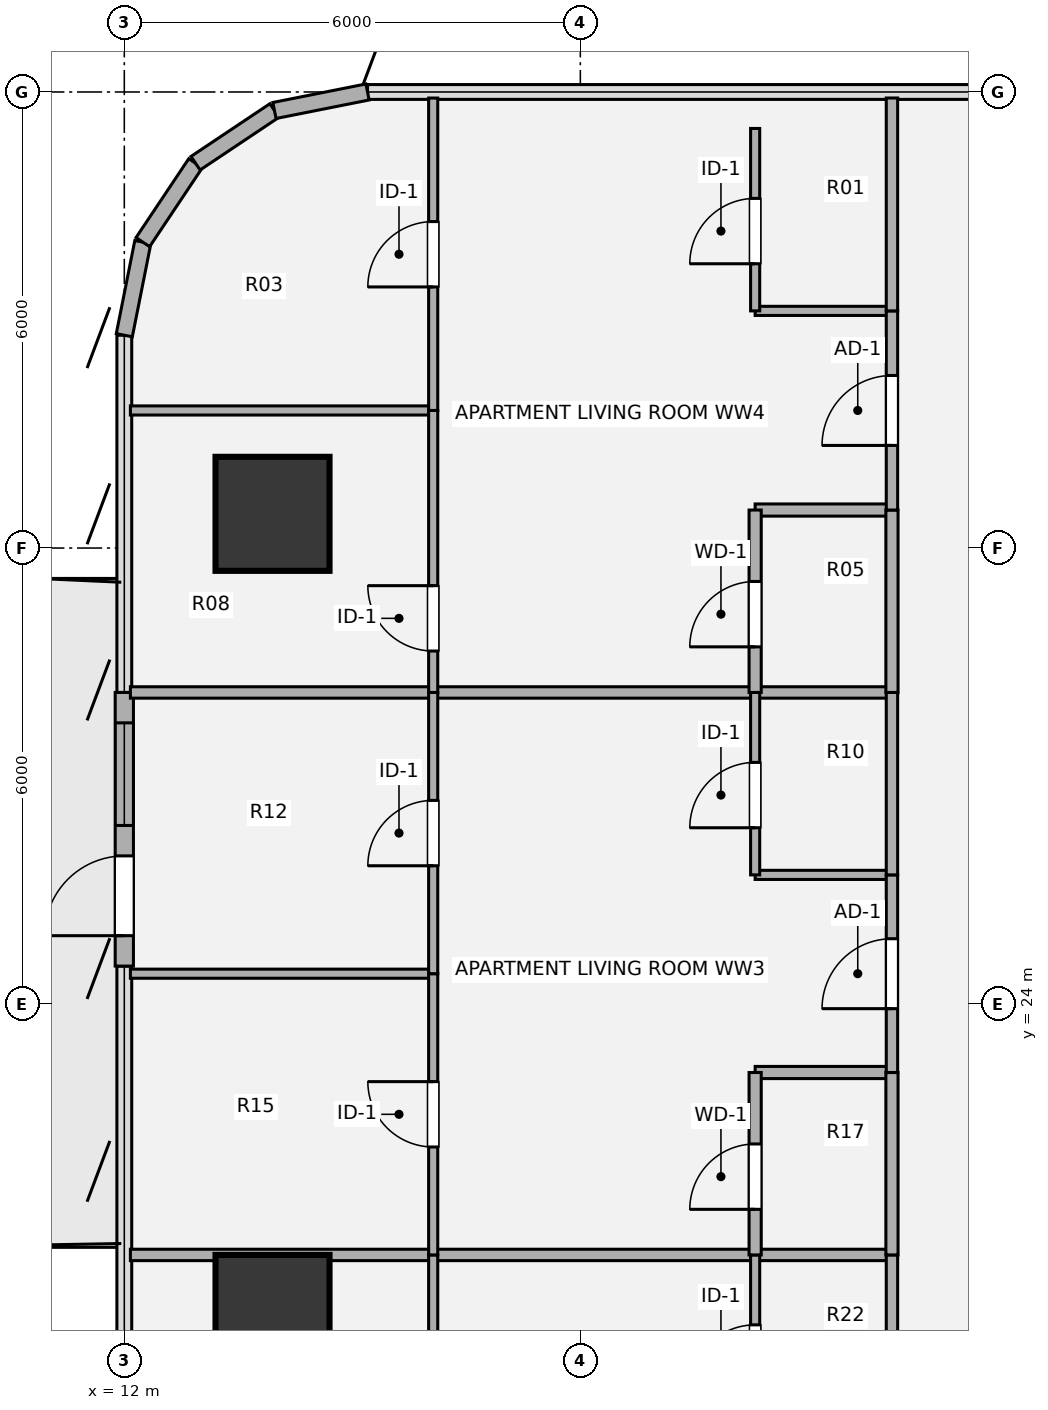
"""IFC4 building model, lengths in metres.
Left out: names, types, materials, properties, quantities, classifications, styles, units other than length and angle.
Written with IfcOpenShell. Run it as: python <this file> out.ifc"""

import sys

from ifc_helpers import new_model, si_unit, direction, frame, frame_2d, origin, origin_2d, place, context, subcontext, project, spatial, rectangle, hollow_circle, extrude, source, transform, mapped, element, fill, save


model = new_model("IFC4")
c1 = context("Model", 3, precision=1e-05, world=origin(), true_north=direction((0.0, 1.0)))
c2 = subcontext(c1, "Body", "Model", "MODEL_VIEW")
j1 = project(units=[si_unit("LENGTHUNIT", "METRE"), si_unit("PLANEANGLEUNIT", "RADIAN")], contexts=[c1])
p1 = place(None, origin())
s1 = spatial("IfcSite", under=j1, at=p1, CompositionType="ELEMENT")
p2 = place(p1, origin())
s2 = spatial("IfcBuilding", under=s1, at=p2, CompositionType="ELEMENT")
p3 = place(p2, frame((0.0, 0.0, 34.56)))
s3 = spatial("IfcBuildingStorey", under=s2, at=p3, CompositionType="ELEMENT", Elevation=34.56)
m1 = source(origin(), c2, "Body", "SweptSolid", [
    extrude(hollow_circle(Radius=0.75, WallThickness=0.05, at=origin_2d()), origin(), (0.0, 0.0, 1.0), 3.78),
])
for number, where, z_axis, x_axis in (
    (1, (13.95, 19.95, 0.0), (0.0, 0.0, 1.0), (1.0, 0.0, 0.0)),
    (2, (13.95, 30.45, 0.0), (0.0, 0.0, 1.0), (1.0, 0.0, 0.0)),
):
    element("IfcColumn", number, at=place(p3, frame(where, z_axis=z_axis, x_axis=x_axis)), inside=s3, PredefinedType="COLUMN", context=c2, shape_type="MappedRepresentation", body=[
        mapped(m1, transform((0.0, 0.0, 0.0), x_axis=(1.0, 0.0, 0.0), y_axis=(0.0, 1.0, 0.0), z_axis=(0.0, 0.0, 1.0), scale=1.0)),
    ])
p4 = place(p3, frame((12.0, 24.5, 0.0), z_axis=(0.0, 0.0, 1.0), x_axis=(0.0, 1.0, 0.0)))
e3 = element("IfcWall", 3, at=p4, inside=s3, PredefinedType="SOLIDWALL", context=c2, shape_type="SweptSolid", body=[
    extrude(rectangle(XDim=3.6, YDim=0.24, at=frame_2d((1.8, 0.0))), origin(), (0.0, 0.0, 1.0), 3.53),
])
p5 = place(p4, frame((0.4, 0.0, 0.0)))
e4 = element("IfcOpeningElement", 4, at=p5, cuts=e3, PredefinedType="OPENING", context=c2, shape_type="SweptSolid", body=[
    extrude(rectangle(XDim=1.05, YDim=2.15, at=origin_2d()), frame((0.525, 0.13, 1.075), z_axis=(0.0, -1.0, 0.0), x_axis=(1.0, 0.0, 0.0)), (0.0, 0.0, 1.0), 0.26),
])
p6 = place(p4, frame((1.85, 0.0, 0.85)))
e5 = element("IfcOpeningElement", 5, at=p6, cuts=e3, PredefinedType="OPENING", context=c2, shape_type="SweptSolid", body=[
    extrude(rectangle(XDim=1.35, YDim=1.35, at=origin_2d()), frame((0.675, 0.13, 0.675), z_axis=(0.0, -1.0, 0.0), x_axis=(1.0, 0.0, 0.0)), (0.0, 0.0, 1.0), 0.26),
])
for number, where, z_axis, x_axis in (
    (6, (12.0, 32.8, 0.0), (0.0, 0.0, 1.0), (0.195, 0.981, 0.0)),
    (7, (12.244, 34.025, 0.0), (0.0, 0.0, 1.0), (0.556, 0.831, 0.0)),
    (8, (12.937, 35.063, 0.0), (0.0, 0.0, 1.0), (0.831, 0.556, 0.0)),
    (9, (13.975, 35.756, 0.0), (0.0, 0.0, 1.0), (0.981, 0.195, 0.0)),
):
    element("IfcWall", number, at=place(p3, frame(where, z_axis=z_axis, x_axis=x_axis)), inside=s3, PredefinedType="SOLIDWALL", context=c2, shape_type="SweptSolid", body=[
        extrude(rectangle(XDim=1.249, YDim=0.215, at=frame_2d((0.624, 0.0))), origin(), (0.0, 0.0, 1.0), 3.53),
    ])
p7 = place(p3, frame((12.08, 20.7, 0.0), z_axis=(0.0, 0.0, 1.0), x_axis=(1.0, 0.0, 0.0)))
e10 = element("IfcWall", 10, at=p7, inside=s3, PredefinedType="PARTITIONING", context=c2, shape_type="SweptSolid", body=[
    extrude(rectangle(XDim=10.02, YDim=0.15, at=frame_2d((5.01, 0.0))), origin(), (0.0, 0.0, 1.0), 2.982),
])
p8 = place(p3, frame((20.3, 23.1, 0.0), z_axis=(0.0, 0.0, 1.0), x_axis=(1.0, 0.0, 0.0)))
e11 = element("IfcWall", 11, at=p8, inside=s3, PredefinedType="PLUMBINGWALL", context=c2, shape_type="SweptSolid", body=[
    extrude(rectangle(XDim=1.8, YDim=0.16, at=frame_2d((0.9, 0.0))), origin(), (0.0, 0.0, 1.0), 3.055),
])
p9 = place(p3, frame((12.08, 24.4, 0.0), z_axis=(0.0, 0.0, 1.0), x_axis=(1.0, 0.0, 0.0)))
e12 = element("IfcWall", 12, at=p9, inside=s3, PredefinedType="PARTITIONING", context=c2, shape_type="SweptSolid", body=[
    extrude(rectangle(XDim=3.984, YDim=0.12, at=frame_2d((1.992, 0.0))), origin(), (0.0, 0.0, 1.0), 2.982),
])
p10 = place(p3, frame((20.3, 25.7, 0.0), z_axis=(0.0, 0.0, 1.0), x_axis=(1.0, 0.0, 0.0)))
e13 = element("IfcWall", 13, at=p10, inside=s3, PredefinedType="PARTITIONING", context=c2, shape_type="SweptSolid", body=[
    extrude(rectangle(XDim=1.8, YDim=0.12, at=frame_2d((0.9, 0.0))), origin(), (0.0, 0.0, 1.0), 2.982),
])
p11 = place(p3, frame((12.08, 28.1, 0.0), z_axis=(0.0, 0.0, 1.0), x_axis=(1.0, 0.0, 0.0)))
e14 = element("IfcWall", 14, at=p11, inside=s3, PredefinedType="PARTITIONING", context=c2, shape_type="SweptSolid", body=[
    extrude(rectangle(XDim=10.02, YDim=0.15, at=frame_2d((5.01, 0.0))), origin(), (0.0, 0.0, 1.0), 2.982),
])
p12 = place(p3, frame((20.3, 30.5, 0.0), z_axis=(0.0, 0.0, 1.0), x_axis=(1.0, 0.0, 0.0)))
e15 = element("IfcWall", 15, at=p12, inside=s3, PredefinedType="PLUMBINGWALL", context=c2, shape_type="SweptSolid", body=[
    extrude(rectangle(XDim=1.8, YDim=0.16, at=frame_2d((0.9, 0.0))), origin(), (0.0, 0.0, 1.0), 2.903),
])
p13 = place(p3, frame((12.08, 31.81, 0.0), z_axis=(0.0, 0.0, 1.0), x_axis=(1.0, 0.0, 0.0)))
e16 = element("IfcWall", 16, at=p13, inside=s3, PredefinedType="PARTITIONING", context=c2, shape_type="SweptSolid", body=[
    extrude(rectangle(XDim=3.984, YDim=0.12, at=frame_2d((1.992, 0.0))), origin(), (0.0, 0.0, 1.0), 3.5),
])
p14 = place(p3, frame((20.3, 33.12, 0.0), z_axis=(0.0, 0.0, 1.0), x_axis=(1.0, 0.0, 0.0)))
e17 = element("IfcWall", 17, at=p14, inside=s3, PredefinedType="PARTITIONING", context=c2, shape_type="SweptSolid", body=[
    extrude(rectangle(XDim=1.8, YDim=0.12, at=frame_2d((0.9, 0.0))), origin(), (0.0, 0.0, 1.0), 3.055),
])
p15 = place(p3, frame((16.064, 17.05, 0.0), z_axis=(0.0, 0.0, 1.0), x_axis=(0.0, 1.0, 0.0)))
e18 = element("IfcWall", 18, at=p15, inside=s3, PredefinedType="PARTITIONING", context=c2, shape_type="SweptSolid", body=[
    extrude(rectangle(XDim=3.65, YDim=0.12, at=frame_2d((1.825, 0.0))), origin(), (0.0, 0.0, 1.0), 3.5),
])
p16 = place(p15, frame((1.075, 0.0, 0.0)))
e19 = element("IfcOpeningElement", 19, at=p16, cuts=e18, PredefinedType="OPENING", context=c2, shape_type="SweptSolid", body=[
    extrude(rectangle(XDim=0.86, YDim=2.1, at=origin_2d()), frame((0.43, 0.07, 1.05), z_axis=(0.0, -1.0, 0.0), x_axis=(1.0, 0.0, 0.0)), (0.0, 0.0, 1.0), 0.14),
])
p17 = place(p3, frame((16.064, 20.7, 0.0), z_axis=(0.0, 0.0, 1.0), x_axis=(0.0, 1.0, 0.0)))
e20 = element("IfcWall", 20, at=p17, inside=s3, PredefinedType="PARTITIONING", context=c2, shape_type="SweptSolid", body=[
    extrude(rectangle(XDim=3.7, YDim=0.12, at=frame_2d((1.85, 0.0))), origin(), (0.0, 0.0, 1.0), 3.5),
])
p18 = place(p17, frame((1.42, 0.0, 0.0)))
e21 = element("IfcOpeningElement", 21, at=p18, cuts=e20, PredefinedType="OPENING", context=c2, shape_type="SweptSolid", body=[
    extrude(rectangle(XDim=0.86, YDim=2.1, at=origin_2d()), frame((0.43, 0.07, 1.05), z_axis=(0.0, -1.0, 0.0), x_axis=(1.0, 0.0, 0.0)), (0.0, 0.0, 1.0), 0.14),
])
p19 = place(p3, frame((16.064, 24.4, 0.0), z_axis=(0.0, 0.0, 1.0), x_axis=(0.0, 1.0, 0.0)))
e22 = element("IfcWall", 22, at=p19, inside=s3, PredefinedType="PARTITIONING", context=c2, shape_type="SweptSolid", body=[
    extrude(rectangle(XDim=3.7, YDim=0.12, at=frame_2d((1.85, 0.0))), origin(), (0.0, 0.0, 1.0), 3.5),
])
p20 = place(p19, frame((1.42, 0.0, 0.0)))
e23 = element("IfcOpeningElement", 23, at=p20, cuts=e22, PredefinedType="OPENING", context=c2, shape_type="SweptSolid", body=[
    extrude(rectangle(XDim=0.86, YDim=2.1, at=origin_2d()), frame((0.43, 0.07, 1.05), z_axis=(0.0, -1.0, 0.0), x_axis=(1.0, 0.0, 0.0)), (0.0, 0.0, 1.0), 0.14),
])
p21 = place(p3, frame((16.064, 28.1, 0.0), z_axis=(0.0, 0.0, 1.0), x_axis=(0.0, 1.0, 0.0)))
e24 = element("IfcWall", 24, at=p21, inside=s3, PredefinedType="PARTITIONING", context=c2, shape_type="SweptSolid", body=[
    extrude(rectangle(XDim=3.71, YDim=0.12, at=frame_2d((1.855, 0.0))), origin(), (0.0, 0.0, 1.0), 3.5),
])
p22 = place(p21, frame((0.545, 0.0, 0.0)))
e25 = element("IfcOpeningElement", 25, at=p22, cuts=e24, PredefinedType="OPENING", context=c2, shape_type="SweptSolid", body=[
    extrude(rectangle(XDim=0.86, YDim=2.1, at=origin_2d()), frame((0.43, 0.07, 1.05), z_axis=(0.0, -1.0, 0.0), x_axis=(1.0, 0.0, 0.0)), (0.0, 0.0, 1.0), 0.14),
])
p23 = place(p3, frame((16.064, 31.81, 0.0), z_axis=(0.0, 0.0, 1.0), x_axis=(0.0, 1.0, 0.0)))
e26 = element("IfcWall", 26, at=p23, inside=s3, PredefinedType="PARTITIONING", context=c2, shape_type="SweptSolid", body=[
    extrude(rectangle(XDim=4.11, YDim=0.12, at=frame_2d((2.055, 0.0))), origin(), (0.0, 0.0, 1.0), 3.5),
])
p24 = place(p23, frame((1.625, 0.0, 0.0)))
e27 = element("IfcOpeningElement", 27, at=p24, cuts=e26, PredefinedType="OPENING", context=c2, shape_type="SweptSolid", body=[
    extrude(rectangle(XDim=0.86, YDim=2.1, at=origin_2d()), frame((0.43, 0.07, 1.05), z_axis=(0.0, -1.0, 0.0), x_axis=(1.0, 0.0, 0.0)), (0.0, 0.0, 1.0), 0.14),
])
p25 = place(p3, frame((20.3, 18.3, 0.0), z_axis=(0.0, 0.0, 1.0), x_axis=(0.0, 1.0, 0.0)))
e28 = element("IfcWall", 28, at=p25, inside=s3, PredefinedType="PARTITIONING", context=c2, shape_type="SweptSolid", body=[
    extrude(rectangle(XDim=2.4, YDim=0.12, at=frame_2d((1.2, 0.0))), origin(), (0.0, 0.0, 1.0), 3.5),
])
p26 = place(p25, frame((0.62, 0.0, 0.0)))
e29 = element("IfcOpeningElement", 29, at=p26, cuts=e28, PredefinedType="OPENING", context=c2, shape_type="SweptSolid", body=[
    extrude(rectangle(XDim=0.86, YDim=2.1, at=origin_2d()), frame((0.43, 0.07, 1.05), z_axis=(0.0, -1.0, 0.0), x_axis=(1.0, 0.0, 0.0)), (0.0, 0.0, 1.0), 0.14),
])
p27 = place(p3, frame((20.3, 20.7, 0.0), z_axis=(0.0, 0.0, 1.0), x_axis=(0.0, 1.0, 0.0)))
e30 = element("IfcWall", 30, at=p27, inside=s3, PredefinedType="PLUMBINGWALL", context=c2, shape_type="SweptSolid", body=[
    extrude(rectangle(XDim=2.4, YDim=0.16, at=frame_2d((1.2, 0.0))), origin(), (0.0, 0.0, 1.0), 3.5),
])
p28 = place(p27, frame((0.6, 0.0, 0.0)))
e31 = element("IfcOpeningElement", 31, at=p28, cuts=e30, PredefinedType="OPENING", context=c2, shape_type="SweptSolid", body=[
    extrude(rectangle(XDim=0.86, YDim=2.1, at=origin_2d()), frame((0.43, 0.09, 1.05), z_axis=(0.0, -1.0, 0.0), x_axis=(1.0, 0.0, 0.0)), (0.0, 0.0, 1.0), 0.18),
])
p29 = place(p3, frame((20.3, 25.7, 0.0), z_axis=(0.0, 0.0, 1.0), x_axis=(0.0, 1.0, 0.0)))
e32 = element("IfcWall", 32, at=p29, inside=s3, PredefinedType="PARTITIONING", context=c2, shape_type="SweptSolid", body=[
    extrude(rectangle(XDim=2.4, YDim=0.12, at=frame_2d((1.2, 0.0))), origin(), (0.0, 0.0, 1.0), 3.5),
])
p30 = place(p29, frame((0.62, 0.0, 0.0)))
e33 = element("IfcOpeningElement", 33, at=p30, cuts=e32, PredefinedType="OPENING", context=c2, shape_type="SweptSolid", body=[
    extrude(rectangle(XDim=0.86, YDim=2.1, at=origin_2d()), frame((0.43, 0.07, 1.05), z_axis=(0.0, -1.0, 0.0), x_axis=(1.0, 0.0, 0.0)), (0.0, 0.0, 1.0), 0.14),
])
p31 = place(p3, frame((20.3, 28.1, 0.0), z_axis=(0.0, 0.0, 1.0), x_axis=(0.0, 1.0, 0.0)))
e34 = element("IfcWall", 34, at=p31, inside=s3, PredefinedType="PLUMBINGWALL", context=c2, shape_type="SweptSolid", body=[
    extrude(rectangle(XDim=2.4, YDim=0.16, at=frame_2d((1.2, 0.0))), origin(), (0.0, 0.0, 1.0), 3.5),
])
p32 = place(p31, frame((0.6, 0.0, 0.0)))
e35 = element("IfcOpeningElement", 35, at=p32, cuts=e34, PredefinedType="OPENING", context=c2, shape_type="SweptSolid", body=[
    extrude(rectangle(XDim=0.86, YDim=2.1, at=origin_2d()), frame((0.43, 0.09, 1.05), z_axis=(0.0, -1.0, 0.0), x_axis=(1.0, 0.0, 0.0)), (0.0, 0.0, 1.0), 0.18),
])
p33 = place(p3, frame((20.3, 33.12, 0.0), z_axis=(0.0, 0.0, 1.0), x_axis=(0.0, 1.0, 0.0)))
e36 = element("IfcWall", 36, at=p33, inside=s3, PredefinedType="PARTITIONING", context=c2, shape_type="SweptSolid", body=[
    extrude(rectangle(XDim=2.4, YDim=0.12, at=frame_2d((1.2, 0.0))), origin(), (0.0, 0.0, 1.0), 3.5),
])
p34 = place(p33, frame((0.62, 0.0, 0.0)))
e37 = element("IfcOpeningElement", 37, at=p34, cuts=e36, PredefinedType="OPENING", context=c2, shape_type="SweptSolid", body=[
    extrude(rectangle(XDim=0.86, YDim=2.1, at=origin_2d()), frame((0.43, 0.07, 1.05), z_axis=(0.0, -1.0, 0.0), x_axis=(1.0, 0.0, 0.0)), (0.0, 0.0, 1.0), 0.14),
])
p35 = place(p3, frame((22.1, 18.3, 0.0), z_axis=(0.0, 0.0, 1.0), x_axis=(0.0, 1.0, 0.0)))
e38 = element("IfcWall", 38, at=p35, inside=s3, PredefinedType="PARTITIONING", context=c2, shape_type="SweptSolid", body=[
    extrude(rectangle(XDim=2.4, YDim=0.15, at=frame_2d((1.2, 0.0))), origin(), (0.0, 0.0, 1.0), 3.5),
])
p36 = place(p3, frame((22.1, 20.7, 0.0), z_axis=(0.0, 0.0, 1.0), x_axis=(0.0, 1.0, 0.0)))
e39 = element("IfcWall", 39, at=p36, inside=s3, PredefinedType="PLUMBINGWALL", context=c2, shape_type="SweptSolid", body=[
    extrude(rectangle(XDim=2.4, YDim=0.16, at=frame_2d((1.2, 0.0))), origin(), (0.0, 0.0, 1.0), 3.5),
])
p37 = place(p3, frame((22.1, 23.1, 0.0), z_axis=(0.0, 0.0, 1.0), x_axis=(0.0, 1.0, 0.0)))
e40 = element("IfcWall", 40, at=p37, inside=s3, PredefinedType="PARTITIONING", context=c2, shape_type="SweptSolid", body=[
    extrude(rectangle(XDim=2.6, YDim=0.15, at=frame_2d((1.3, 0.0))), origin(), (0.0, 0.0, 1.0), 3.5),
])
p38 = place(p37, frame((0.84, 0.0, 0.0)))
e41 = element("IfcOpeningElement", 41, at=p38, cuts=e40, PredefinedType="OPENING", context=c2, shape_type="SweptSolid", body=[
    extrude(rectangle(XDim=0.92, YDim=2.1, at=origin_2d()), frame((0.46, 0.085, 1.05), z_axis=(0.0, -1.0, 0.0), x_axis=(1.0, 0.0, 0.0)), (0.0, 0.0, 1.0), 0.17),
])
p39 = place(p3, frame((22.1, 25.7, 0.0), z_axis=(0.0, 0.0, 1.0), x_axis=(0.0, 1.0, 0.0)))
e42 = element("IfcWall", 42, at=p39, inside=s3, PredefinedType="PARTITIONING", context=c2, shape_type="SweptSolid", body=[
    extrude(rectangle(XDim=2.4, YDim=0.15, at=frame_2d((1.2, 0.0))), origin(), (0.0, 0.0, 1.0), 3.5),
])
p40 = place(p3, frame((22.1, 28.1, 0.0), z_axis=(0.0, 0.0, 1.0), x_axis=(0.0, 1.0, 0.0)))
e43 = element("IfcWall", 43, at=p40, inside=s3, PredefinedType="PLUMBINGWALL", context=c2, shape_type="SweptSolid", body=[
    extrude(rectangle(XDim=2.4, YDim=0.16, at=frame_2d((1.2, 0.0))), origin(), (0.0, 0.0, 1.0), 3.5),
])
p41 = place(p3, frame((22.1, 30.5, 0.0), z_axis=(0.0, 0.0, 1.0), x_axis=(0.0, 1.0, 0.0)))
e44 = element("IfcWall", 44, at=p41, inside=s3, PredefinedType="PARTITIONING", context=c2, shape_type="SweptSolid", body=[
    extrude(rectangle(XDim=2.62, YDim=0.15, at=frame_2d((1.31, 0.0))), origin(), (0.0, 0.0, 1.0), 3.5),
])
p42 = place(p41, frame((0.85, 0.0, 0.0)))
e45 = element("IfcOpeningElement", 45, at=p42, cuts=e44, PredefinedType="OPENING", context=c2, shape_type="SweptSolid", body=[
    extrude(rectangle(XDim=0.92, YDim=2.1, at=origin_2d()), frame((0.46, 0.085, 1.05), z_axis=(0.0, -1.0, 0.0), x_axis=(1.0, 0.0, 0.0)), (0.0, 0.0, 1.0), 0.17),
])
p43 = place(p3, frame((22.1, 33.12, 0.0), z_axis=(0.0, 0.0, 1.0), x_axis=(0.0, 1.0, 0.0)))
e46 = element("IfcWall", 46, at=p43, inside=s3, PredefinedType="PARTITIONING", context=c2, shape_type="SweptSolid", body=[
    extrude(rectangle(XDim=2.801, YDim=0.15, at=frame_2d((1.4, 0.0))), origin(), (0.0, 0.0, 1.0), 3.5),
])
m2 = source(origin(), c2, "Body", "SweptSolid", [
    extrude(rectangle(XDim=1.05, YDim=2.15, at=origin_2d()), frame((0.525, 0.025, 1.075), z_axis=(0.0, -1.0, 0.0), x_axis=(1.0, 0.0, 0.0)), (0.0, 0.0, 1.0), 0.05),
])
p44 = place(p5, origin())
e47 = element("IfcDoor", 47, at=p44, inside=s3, OperationType="SINGLE_SWING_LEFT", PredefinedType="DOOR", context=c2, shape_type="MappedRepresentation", body=[
    mapped(m2, transform((0.0, 0.0, 0.0), x_axis=(1.0, 0.0, 0.0), y_axis=(0.0, 1.0, 0.0), z_axis=(0.0, 0.0, 1.0), scale=1.0)),
])
fill(e4, e47)
m3 = source(origin(), c2, "Body", "SweptSolid", [
    extrude(rectangle(XDim=1.35, YDim=1.35, at=origin_2d()), frame((0.675, 0.03, 0.675), z_axis=(0.0, -1.0, 0.0), x_axis=(1.0, 0.0, 0.0)), (0.0, 0.0, 1.0), 0.06),
])
p45 = place(p6, origin())
e48 = element("IfcWindow", 48, at=p45, inside=s3, PartitioningType="SINGLE_PANEL", PredefinedType="WINDOW", context=c2, shape_type="MappedRepresentation", body=[
    mapped(m3, transform((0.0, 0.0, 0.0), x_axis=(1.0, 0.0, 0.0), y_axis=(0.0, 1.0, 0.0), z_axis=(0.0, 0.0, 1.0), scale=1.0)),
])
fill(e5, e48)
m4 = source(origin(), c2, "Body", "SweptSolid", [
    extrude(rectangle(XDim=0.86, YDim=2.1, at=origin_2d()), frame((0.43, 0.025, 1.05), z_axis=(0.0, -1.0, 0.0), x_axis=(1.0, 0.0, 0.0)), (0.0, 0.0, 1.0), 0.05),
])
p46 = place(p18, origin())
e49 = element("IfcDoor", 49, at=p46, inside=s3, OperationType="SINGLE_SWING_RIGHT", PredefinedType="DOOR", context=c2, shape_type="MappedRepresentation", body=[
    mapped(m4, transform((0.0, 0.0, 0.0), x_axis=(1.0, 0.0, 0.0), y_axis=(0.0, 1.0, 0.0), z_axis=(0.0, 0.0, 1.0), scale=1.0)),
])
fill(e21, e49)
p47 = place(p20, origin())
e50 = element("IfcDoor", 50, at=p47, inside=s3, OperationType="SINGLE_SWING_LEFT", PredefinedType="DOOR", context=c2, shape_type="MappedRepresentation", body=[
    mapped(m4, transform((0.0, 0.0, 0.0), x_axis=(1.0, 0.0, 0.0), y_axis=(0.0, 1.0, 0.0), z_axis=(0.0, 0.0, 1.0), scale=1.0)),
])
fill(e23, e50)
p48 = place(p22, origin())
e51 = element("IfcDoor", 51, at=p48, inside=s3, OperationType="SINGLE_SWING_RIGHT", PredefinedType="DOOR", context=c2, shape_type="MappedRepresentation", body=[
    mapped(m4, transform((0.0, 0.0, 0.0), x_axis=(1.0, 0.0, 0.0), y_axis=(0.0, 1.0, 0.0), z_axis=(0.0, 0.0, 1.0), scale=1.0)),
])
fill(e25, e51)
p49 = place(p24, origin())
e52 = element("IfcDoor", 52, at=p49, inside=s3, OperationType="SINGLE_SWING_LEFT", PredefinedType="DOOR", context=c2, shape_type="MappedRepresentation", body=[
    mapped(m4, transform((0.0, 0.0, 0.0), x_axis=(1.0, 0.0, 0.0), y_axis=(0.0, 1.0, 0.0), z_axis=(0.0, 0.0, 1.0), scale=1.0)),
])
fill(e27, e52)
p50 = place(p26, origin())
e53 = element("IfcDoor", 53, at=p50, inside=s3, OperationType="SINGLE_SWING_LEFT", PredefinedType="DOOR", context=c2, shape_type="MappedRepresentation", body=[
    mapped(m4, transform((0.0, 0.0, 0.0), x_axis=(1.0, 0.0, 0.0), y_axis=(0.0, 1.0, 0.0), z_axis=(0.0, 0.0, 1.0), scale=1.0)),
])
fill(e29, e53)
m5 = source(origin(), c2, "Body", "SweptSolid", [
    extrude(rectangle(XDim=0.86, YDim=2.1, at=origin_2d()), frame((0.43, 0.025, 1.05), z_axis=(0.0, -1.0, 0.0), x_axis=(1.0, 0.0, 0.0)), (0.0, 0.0, 1.0), 0.05),
])
p51 = place(p28, origin())
e54 = element("IfcDoor", 54, at=p51, inside=s3, OperationType="SINGLE_SWING_LEFT", PredefinedType="DOOR", context=c2, shape_type="MappedRepresentation", body=[
    mapped(m5, transform((0.0, 0.0, 0.0), x_axis=(1.0, 0.0, 0.0), y_axis=(0.0, 1.0, 0.0), z_axis=(0.0, 0.0, 1.0), scale=1.0)),
])
fill(e31, e54)
p52 = place(p30, origin())
e55 = element("IfcDoor", 55, at=p52, inside=s3, OperationType="SINGLE_SWING_LEFT", PredefinedType="DOOR", context=c2, shape_type="MappedRepresentation", body=[
    mapped(m4, transform((0.0, 0.0, 0.0), x_axis=(1.0, 0.0, 0.0), y_axis=(0.0, 1.0, 0.0), z_axis=(0.0, 0.0, 1.0), scale=1.0)),
])
fill(e33, e55)
p53 = place(p32, origin())
e56 = element("IfcDoor", 56, at=p53, inside=s3, OperationType="SINGLE_SWING_LEFT", PredefinedType="DOOR", context=c2, shape_type="MappedRepresentation", body=[
    mapped(m5, transform((0.0, 0.0, 0.0), x_axis=(1.0, 0.0, 0.0), y_axis=(0.0, 1.0, 0.0), z_axis=(0.0, 0.0, 1.0), scale=1.0)),
])
fill(e35, e56)
p54 = place(p34, origin())
e57 = element("IfcDoor", 57, at=p54, inside=s3, OperationType="SINGLE_SWING_LEFT", PredefinedType="DOOR", context=c2, shape_type="MappedRepresentation", body=[
    mapped(m4, transform((0.0, 0.0, 0.0), x_axis=(1.0, 0.0, 0.0), y_axis=(0.0, 1.0, 0.0), z_axis=(0.0, 0.0, 1.0), scale=1.0)),
])
fill(e37, e57)
m6 = source(origin(), c2, "Body", "SweptSolid", [
    extrude(rectangle(XDim=0.92, YDim=2.1, at=origin_2d()), frame((0.46, 0.025, 1.05), z_axis=(0.0, -1.0, 0.0), x_axis=(1.0, 0.0, 0.0)), (0.0, 0.0, 1.0), 0.05),
])
p55 = place(p38, origin())
e58 = element("IfcDoor", 58, at=p55, inside=s3, OperationType="SINGLE_SWING_LEFT", PredefinedType="DOOR", context=c2, shape_type="MappedRepresentation", body=[
    mapped(m6, transform((0.0, 0.0, 0.0), x_axis=(1.0, 0.0, 0.0), y_axis=(0.0, 1.0, 0.0), z_axis=(0.0, 0.0, 1.0), scale=1.0)),
])
fill(e41, e58)
p56 = place(p42, origin())
e59 = element("IfcDoor", 59, at=p56, inside=s3, OperationType="SINGLE_SWING_LEFT", PredefinedType="DOOR", context=c2, shape_type="MappedRepresentation", body=[
    mapped(m6, transform((0.0, 0.0, 0.0), x_axis=(1.0, 0.0, 0.0), y_axis=(0.0, 1.0, 0.0), z_axis=(0.0, 0.0, 1.0), scale=1.0)),
])
fill(e45, e59)
save(model, sys.argv[1])
